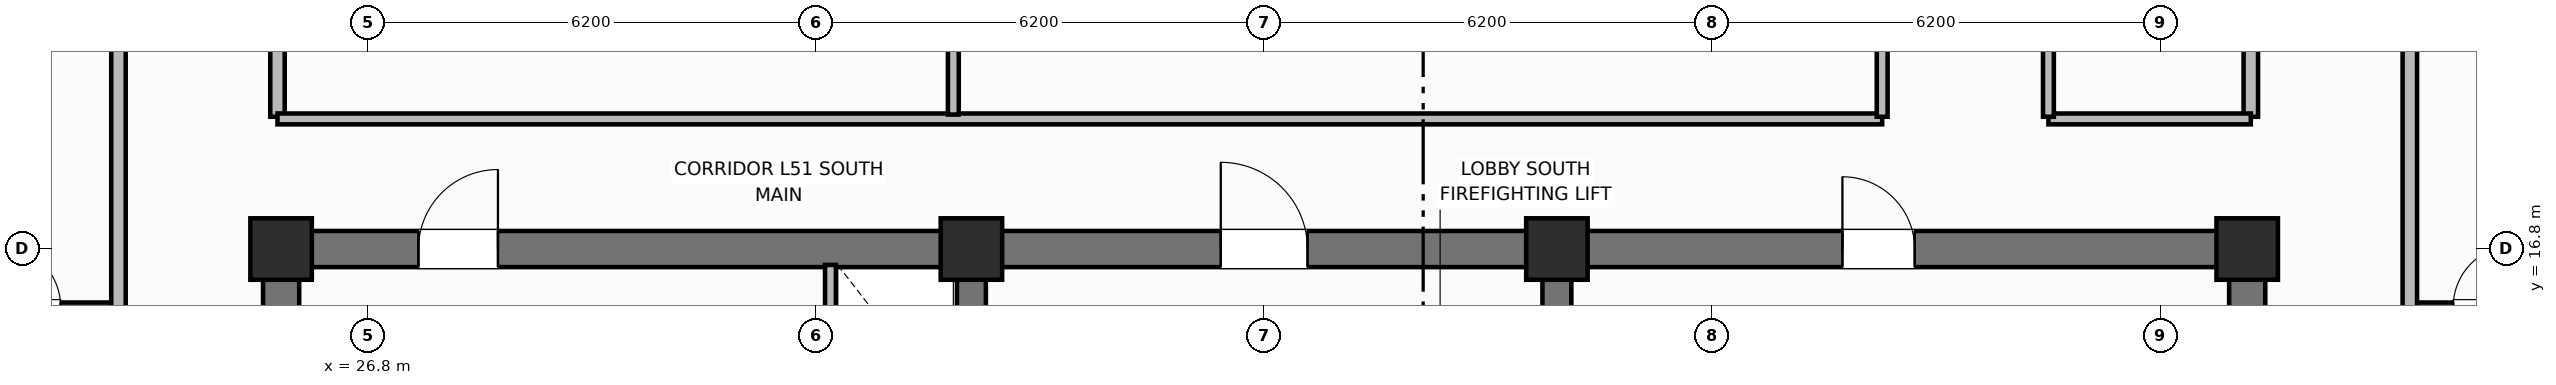
"""IFC4 building model, lengths in metres.
Left out: names, types, materials, properties, quantities, classifications, styles, units other than length and angle.
Written with IfcOpenShell. Run it as: python <this file> out.ifc"""

import sys

from ifc_helpers import new_model, si_unit, direction, frame, frame_2d, origin, origin_2d, place, context, subcontext, project, spatial, rectangle, extrude, element, fill, save


model = new_model("IFC4")
c1 = context("Model", 3, precision=1e-05, world=origin(), true_north=direction((0.0, 1.0)))
c2 = subcontext(c1, "Body", "Model", "MODEL_VIEW")
j1 = project(units=[si_unit("LENGTHUNIT", "METRE"), si_unit("PLANEANGLEUNIT", "RADIAN")], contexts=[c1])
p1 = place(None, origin())
s1 = spatial("IfcSite", under=j1, at=p1, CompositionType="ELEMENT")
p2 = place(p1, origin())
s2 = spatial("IfcBuilding", under=s1, at=p2, CompositionType="ELEMENT")
p3 = place(p2, frame((0.0, 0.0, 207.3)))
s3 = spatial("IfcBuildingStorey", under=s2, at=p3, CompositionType="ELEMENT", Elevation=207.3)
for number, where, z_axis, x_axis in (
    (1, (25.6, 10.85, 0.0), (0.0, 0.0, 1.0), (0.0, 1.0, 0.0)),
    (2, (52.8, 10.85, 0.0), (0.0, 0.0, 1.0), (0.0, 1.0, 0.0)),
):
    element("IfcWall", number, at=place(p3, frame(where, z_axis=z_axis, x_axis=x_axis)), inside=s3, PredefinedType="SHEAR", context=c2, shape_type="SweptSolid", body=[
        extrude(rectangle(XDim=5.7, YDim=0.5, at=frame_2d((2.85, 0.0))), origin(), (0.0, 0.0, 1.0), 3.7),
    ])
p4 = place(p3, frame((25.6, 16.8, 0.0), z_axis=(0.0, 0.0, 1.0), x_axis=(1.0, 0.0, 0.0)))
e3 = element("IfcWall", 3, at=p4, inside=s3, PredefinedType="SHEAR", context=c2, shape_type="SweptSolid", body=[
    extrude(rectangle(XDim=27.2, YDim=0.5, at=frame_2d((13.6, 0.0))), origin(), (0.0, 0.0, 1.0), 3.7),
])
p5 = place(p4, frame((1.9, 0.0, 0.0)))
e4 = element("IfcOpeningElement", 4, at=p5, cuts=e3, PredefinedType="OPENING", context=c2, shape_type="SweptSolid", body=[
    extrude(rectangle(XDim=1.1, YDim=2.15, at=frame_2d((0.55, 1.075))), frame((0.0, 0.26, 0.0), z_axis=(0.0, -1.0, 0.0), x_axis=(1.0, 0.0, 0.0)), (0.0, 0.0, 1.0), 0.52),
])
p6 = place(p4, frame((13.0, 0.0, 0.0)))
e5 = element("IfcOpeningElement", 5, at=p6, cuts=e3, PredefinedType="OPENING", context=c2, shape_type="SweptSolid", body=[
    extrude(rectangle(XDim=1.2, YDim=2.15, at=frame_2d((0.6, 1.075))), frame((0.0, 0.26, 0.0), z_axis=(0.0, -1.0, 0.0), x_axis=(1.0, 0.0, 0.0)), (0.0, 0.0, 1.0), 0.52),
])
p7 = place(p4, frame((21.6, 0.0, 0.0)))
e6 = element("IfcOpeningElement", 6, at=p7, cuts=e3, PredefinedType="OPENING", context=c2, shape_type="SweptSolid", body=[
    extrude(rectangle(XDim=1.0, YDim=2.15, at=frame_2d((0.5, 1.075))), frame((0.0, 0.26, 0.0), z_axis=(0.0, -1.0, 0.0), x_axis=(1.0, 0.0, 0.0)), (0.0, 0.0, 1.0), 0.52),
])
for number, where, z_axis, x_axis in (
    (7, (35.15, 10.85, 0.0), (0.0, 0.0, 1.0), (0.0, 1.0, 0.0)),
    (8, (43.25, 10.85, 0.0), (0.0, 0.0, 1.0), (0.0, 1.0, 0.0)),
):
    element("IfcWall", number, at=place(p3, frame(where, z_axis=z_axis, x_axis=x_axis)), inside=s3, PredefinedType="SHEAR", context=c2, shape_type="SweptSolid", body=[
        extrude(rectangle(XDim=5.7, YDim=0.4, at=frame_2d((2.85, 0.0))), origin(), (0.0, 0.0, 1.0), 3.7),
    ])
for number, where, z_axis, x_axis in (
    (9, (25.6, 16.8, 0.0), (0.0, 0.0, 1.0), (1.0, 0.0, 0.0)),
    (10, (35.15, 16.8, 0.0), (0.0, 0.0, 1.0), (1.0, 0.0, 0.0)),
    (11, (43.25, 16.8, 0.0), (0.0, 0.0, 1.0), (1.0, 0.0, 0.0)),
    (12, (52.8, 16.8, 0.0), (0.0, 0.0, 1.0), (1.0, 0.0, 0.0)),
):
    element("IfcColumn", number, at=place(p3, frame(where, z_axis=z_axis, x_axis=x_axis)), inside=s3, PredefinedType="COLUMN", context=c2, shape_type="SweptSolid", body=[
        extrude(rectangle(XDim=0.85, YDim=0.85, at=origin_2d()), origin(), (0.0, 0.0, 1.0), 3.7),
    ])
p8 = place(p3, frame((33.2, 14.5, 0.0), z_axis=(0.0, 0.0, 1.0), x_axis=(0.0, 1.0, 0.0)))
e13 = element("IfcWall", 13, at=p8, inside=s3, PredefinedType="PARTITIONING", context=c2, shape_type="SweptSolid", body=[
    extrude(rectangle(XDim=2.08, YDim=0.15, at=frame_2d((1.04, 0.0))), origin(), (0.0, 0.0, 1.0), 2.55),
])
p9 = place(p8, frame((0.55, 0.0, 0.0)))
e14 = element("IfcOpeningElement", 14, at=p9, cuts=e13, PredefinedType="OPENING", context=c2, shape_type="SweptSolid", body=[
    extrude(rectangle(XDim=0.85, YDim=2.05, at=frame_2d((0.425, 1.025))), frame((0.0, 0.085, 0.0), z_axis=(0.0, -1.0, 0.0), x_axis=(1.0, 0.0, 0.0)), (0.0, 0.0, 1.0), 0.17),
])
for number, where, z_axis, x_axis in (
    (15, (25.55, 18.63, 0.0), (0.0, 0.0, 1.0), (0.0, 1.0, 0.0)),
    (16, (52.85, 18.63, 0.0), (0.0, 0.0, 1.0), (0.0, 1.0, 0.0)),
):
    element("IfcWall", number, at=place(p3, frame(where, z_axis=z_axis, x_axis=x_axis)), inside=s3, PredefinedType="PARTITIONING", context=c2, shape_type="SweptSolid", body=[
        extrude(rectangle(XDim=19.14, YDim=0.2, at=frame_2d((9.57, 0.0))), origin(), (0.0, 0.0, 1.0), 2.55),
    ])
p10 = place(p3, frame((25.55, 18.6, 0.0), z_axis=(0.0, 0.0, 1.0), x_axis=(1.0, 0.0, 0.0)))
e17 = element("IfcWall", 17, at=p10, inside=s3, PredefinedType="PARTITIONING", context=c2, shape_type="SweptSolid", body=[
    extrude(rectangle(XDim=22.2, YDim=0.15, at=frame_2d((11.1, 0.0))), origin(), (0.0, 0.0, 1.0), 2.55),
])
p11 = place(p3, frame((50.05, 18.6, 0.0), z_axis=(0.0, 0.0, 1.0), x_axis=(1.0, 0.0, 0.0)))
e18 = element("IfcWall", 18, at=p11, inside=s3, PredefinedType="PARTITIONING", context=c2, shape_type="SweptSolid", body=[
    extrude(rectangle(XDim=2.8, YDim=0.15, at=frame_2d((1.4, 0.0))), origin(), (0.0, 0.0, 1.0), 2.55),
])
p12 = place(p3, frame((34.9, 18.66, 0.0), z_axis=(0.0, 0.0, 1.0), x_axis=(0.0, 1.0, 0.0)))
e19 = element("IfcWall", 19, at=p12, inside=s3, PredefinedType="PARTITIONING", context=c2, shape_type="SweptSolid", body=[
    extrude(rectangle(XDim=19.08, YDim=0.15, at=frame_2d((9.54, 0.0))), origin(), (0.0, 0.0, 1.0), 2.55),
])
p13 = place(p12, frame((5.0, 0.0, 0.0)))
e20 = element("IfcOpeningElement", 20, at=p13, cuts=e19, PredefinedType="OPENING", context=c2, shape_type="SweptSolid", body=[
    extrude(rectangle(XDim=1.0, YDim=2.15, at=frame_2d((0.5, 1.075))), frame((0.0, 0.085, 0.0), z_axis=(0.0, -1.0, 0.0), x_axis=(1.0, 0.0, 0.0)), (0.0, 0.0, 1.0), 0.17),
])
p14 = place(p3, frame((47.75, 18.63, 0.0), z_axis=(0.0, 0.0, 1.0), x_axis=(0.0, 1.0, 0.0)))
e21 = element("IfcWall", 21, at=p14, inside=s3, PredefinedType="PARTITIONING", context=c2, shape_type="SweptSolid", body=[
    extrude(rectangle(XDim=19.14, YDim=0.15, at=frame_2d((9.57, 0.0))), origin(), (0.0, 0.0, 1.0), 2.55),
])
p15 = place(p14, frame((2.4, 0.0, 0.0)))
e22 = element("IfcOpeningElement", 22, at=p15, cuts=e21, PredefinedType="OPENING", context=c2, shape_type="SweptSolid", body=[
    extrude(rectangle(XDim=0.9, YDim=2.1, at=frame_2d((0.45, 1.05))), frame((0.0, 0.085, 0.0), z_axis=(0.0, -1.0, 0.0), x_axis=(1.0, 0.0, 0.0)), (0.0, 0.0, 1.0), 0.17),
])
p16 = place(p14, frame((9.847, 0.0, 0.0)))
e23 = element("IfcOpeningElement", 23, at=p16, cuts=e21, PredefinedType="OPENING", context=c2, shape_type="SweptSolid", body=[
    extrude(rectangle(XDim=0.9, YDim=2.1, at=frame_2d((0.45, 1.05))), frame((0.0, 0.085, 0.0), z_axis=(0.0, -1.0, 0.0), x_axis=(1.0, 0.0, 0.0)), (0.0, 0.0, 1.0), 0.17),
])
p17 = place(p3, frame((50.05, 18.63, 0.0), z_axis=(0.0, 0.0, 1.0), x_axis=(0.0, 1.0, 0.0)))
e24 = element("IfcWall", 24, at=p17, inside=s3, PredefinedType="PARTITIONING", context=c2, shape_type="SweptSolid", body=[
    extrude(rectangle(XDim=19.14, YDim=0.15, at=frame_2d((9.57, 0.0))), origin(), (0.0, 0.0, 1.0), 2.55),
])
p18 = place(p17, frame((2.2, 0.0, 0.0)))
e25 = element("IfcOpeningElement", 25, at=p18, cuts=e24, PredefinedType="OPENING", context=c2, shape_type="SweptSolid", body=[
    extrude(rectangle(XDim=1.0, YDim=2.15, at=frame_2d((0.5, 1.075))), frame((0.0, 0.085, 0.0), z_axis=(0.0, -1.0, 0.0), x_axis=(1.0, 0.0, 0.0)), (0.0, 0.0, 1.0), 0.17),
])
p19 = place(p17, frame((9.847, 0.0, 0.0)))
e26 = element("IfcOpeningElement", 26, at=p19, cuts=e24, PredefinedType="OPENING", context=c2, shape_type="SweptSolid", body=[
    extrude(rectangle(XDim=1.0, YDim=2.15, at=frame_2d((0.5, 1.075))), frame((0.0, 0.085, 0.0), z_axis=(0.0, -1.0, 0.0), x_axis=(1.0, 0.0, 0.0)), (0.0, 0.0, 1.0), 0.17),
])
p20 = place(p3, frame((21.1, 16.0, 0.0), z_axis=(0.0, 0.0, 1.0), x_axis=(1.0, 0.0, 0.0)))
e27 = element("IfcWall", 27, at=p20, inside=s3, PredefinedType="PARTITIONING", context=c2, shape_type="SweptSolid", body=[
    extrude(rectangle(XDim=2.25, YDim=0.12, at=frame_2d((1.125, 0.0))), origin(), (0.0, 0.0, 1.0), 2.55),
])
p21 = place(p20, frame((0.6, 0.0, 0.0)))
e28 = element("IfcOpeningElement", 28, at=p21, cuts=e27, PredefinedType="OPENING", context=c2, shape_type="SweptSolid", body=[
    extrude(rectangle(XDim=0.85, YDim=2.1, at=frame_2d((0.425, 1.05))), frame((0.0, 0.07, 0.0), z_axis=(0.0, -1.0, 0.0), x_axis=(1.0, 0.0, 0.0)), (0.0, 0.0, 1.0), 0.14),
])
p22 = place(p3, frame((23.35, 10.6, 0.0), z_axis=(0.0, 0.0, 1.0), x_axis=(0.0, 1.0, 0.0)))
e29 = element("IfcWall", 29, at=p22, inside=s3, PredefinedType="PARTITIONING", context=c2, shape_type="SweptSolid", body=[
    extrude(rectangle(XDim=35.2, YDim=0.2, at=frame_2d((17.6, 0.0))), origin(), (0.0, 0.0, 1.0), 2.55),
])
p23 = place(p22, frame((2.65, 0.0, 0.0)))
e30 = element("IfcOpeningElement", 30, at=p23, cuts=e29, PredefinedType="OPENING", context=c2, shape_type="SweptSolid", body=[
    extrude(rectangle(XDim=1.0, YDim=2.15, at=frame_2d((0.5, 1.075))), frame((0.0, 0.11, 0.0), z_axis=(0.0, -1.0, 0.0), x_axis=(1.0, 0.0, 0.0)), (0.0, 0.0, 1.0), 0.22),
])
p24 = place(p22, frame((19.79, 0.0, 0.0)))
e31 = element("IfcOpeningElement", 31, at=p24, cuts=e29, PredefinedType="OPENING", context=c2, shape_type="SweptSolid", body=[
    extrude(rectangle(XDim=1.0, YDim=2.15, at=frame_2d((0.5, 1.075))), frame((0.0, 0.11, 0.0), z_axis=(0.0, -1.0, 0.0), x_axis=(1.0, 0.0, 0.0)), (0.0, 0.0, 1.0), 0.22),
])
p25 = place(p3, frame((55.05, 16.0, 0.0), z_axis=(0.0, 0.0, 1.0), x_axis=(1.0, 0.0, 0.0)))
e32 = element("IfcWall", 32, at=p25, inside=s3, PredefinedType="PARTITIONING", context=c2, shape_type="SweptSolid", body=[
    extrude(rectangle(XDim=2.25, YDim=0.12, at=frame_2d((1.125, 0.0))), origin(), (0.0, 0.0, 1.0), 2.55),
])
p26 = place(p25, frame((0.6, 0.0, 0.0)))
e33 = element("IfcOpeningElement", 33, at=p26, cuts=e32, PredefinedType="OPENING", context=c2, shape_type="SweptSolid", body=[
    extrude(rectangle(XDim=0.85, YDim=2.1, at=frame_2d((0.425, 1.05))), frame((0.0, 0.07, 0.0), z_axis=(0.0, -1.0, 0.0), x_axis=(1.0, 0.0, 0.0)), (0.0, 0.0, 1.0), 0.14),
])
p27 = place(p3, frame((55.05, 10.6, 0.0), z_axis=(0.0, 0.0, 1.0), x_axis=(0.0, 1.0, 0.0)))
e34 = element("IfcWall", 34, at=p27, inside=s3, PredefinedType="PARTITIONING", context=c2, shape_type="SweptSolid", body=[
    extrude(rectangle(XDim=35.2, YDim=0.2, at=frame_2d((17.6, 0.0))), origin(), (0.0, 0.0, 1.0), 2.55),
])
p28 = place(p27, frame((2.65, 0.0, 0.0)))
e35 = element("IfcOpeningElement", 35, at=p28, cuts=e34, PredefinedType="OPENING", context=c2, shape_type="SweptSolid", body=[
    extrude(rectangle(XDim=1.0, YDim=2.15, at=frame_2d((0.5, 1.075))), frame((0.0, 0.11, 0.0), z_axis=(0.0, -1.0, 0.0), x_axis=(1.0, 0.0, 0.0)), (0.0, 0.0, 1.0), 0.22),
])
p29 = place(p27, frame((12.166, 0.0, 0.0)))
e36 = element("IfcOpeningElement", 36, at=p29, cuts=e34, PredefinedType="OPENING", context=c2, shape_type="SweptSolid", body=[
    extrude(rectangle(XDim=1.0, YDim=2.15, at=frame_2d((0.5, 1.075))), frame((0.0, 0.11, 0.0), z_axis=(0.0, -1.0, 0.0), x_axis=(1.0, 0.0, 0.0)), (0.0, 0.0, 1.0), 0.22),
])
p30 = place(p27, frame((23.65, 0.0, 0.0)))
e37 = element("IfcOpeningElement", 37, at=p30, cuts=e34, PredefinedType="OPENING", context=c2, shape_type="SweptSolid", body=[
    extrude(rectangle(XDim=1.0, YDim=2.15, at=frame_2d((0.5, 1.075))), frame((0.0, 0.11, 0.0), z_axis=(0.0, -1.0, 0.0), x_axis=(1.0, 0.0, 0.0)), (0.0, 0.0, 1.0), 0.22),
])
p31 = place(p21, origin())
e38 = element("IfcDoor", 38, at=p31, inside=s3, OperationType="SINGLE_SWING_LEFT", PredefinedType="DOOR", context=c2, shape_type="SweptSolid", body=[
    extrude(rectangle(XDim=0.85, YDim=2.1, at=frame_2d((0.425, 1.05))), frame((0.0, 0.025, 0.0), z_axis=(0.0, -1.0, 0.0), x_axis=(1.0, 0.0, 0.0)), (0.0, 0.0, 1.0), 0.05),
])
fill(e28, e38)
p32 = place(p26, origin())
e39 = element("IfcDoor", 39, at=p32, inside=s3, OperationType="SINGLE_SWING_RIGHT", PredefinedType="DOOR", context=c2, shape_type="SweptSolid", body=[
    extrude(rectangle(XDim=0.85, YDim=2.1, at=frame_2d((0.425, 1.05))), frame((0.0, 0.025, 0.0), z_axis=(0.0, -1.0, 0.0), x_axis=(1.0, 0.0, 0.0)), (0.0, 0.0, 1.0), 0.05),
])
fill(e33, e39)
p33 = place(p5, origin())
e40 = element("IfcDoor", 40, at=p33, inside=s3, OperationType="SINGLE_SWING_RIGHT", PredefinedType="DOOR", context=c2, shape_type="SweptSolid", body=[
    extrude(rectangle(XDim=1.1, YDim=2.15, at=frame_2d((0.55, 1.075))), frame((0.0, 0.025, 0.0), z_axis=(0.0, -1.0, 0.0), x_axis=(1.0, 0.0, 0.0)), (0.0, 0.0, 1.0), 0.05),
])
fill(e4, e40)
p34 = place(p6, origin())
e41 = element("IfcDoor", 41, at=p34, inside=s3, OperationType="SINGLE_SWING_LEFT", PredefinedType="DOOR", context=c2, shape_type="SweptSolid", body=[
    extrude(rectangle(XDim=1.2, YDim=2.15, at=frame_2d((0.6, 1.075))), frame((0.0, 0.025, 0.0), z_axis=(0.0, -1.0, 0.0), x_axis=(1.0, 0.0, 0.0)), (0.0, 0.0, 1.0), 0.05),
])
fill(e5, e41)
p35 = place(p7, origin())
e42 = element("IfcDoor", 42, at=p35, inside=s3, OperationType="SINGLE_SWING_LEFT", PredefinedType="DOOR", context=c2, shape_type="SweptSolid", body=[
    extrude(rectangle(XDim=1.0, YDim=2.15, at=frame_2d((0.5, 1.075))), frame((0.0, 0.025, 0.0), z_axis=(0.0, -1.0, 0.0), x_axis=(1.0, 0.0, 0.0)), (0.0, 0.0, 1.0), 0.05),
])
fill(e6, e42)
save(model, sys.argv[1])
